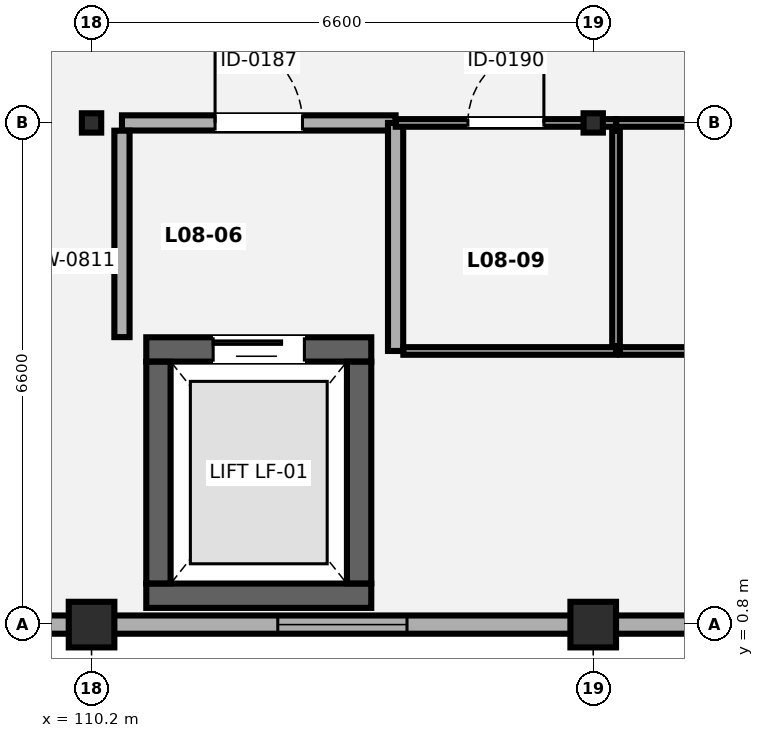
"""IFC4 building model, lengths in metres.
Left out: names, types, materials, properties, quantities, classifications, styles, units other than length and angle.
Written with IfcOpenShell. Run it as: python <this file> out.ifc"""

import sys

from ifc_helpers import new_model, si_unit, direction, frame, frame_2d, origin, origin_2d, place, context, subcontext, project, spatial, rectangle, circle, i_section, extrude, element, fill, save


model = new_model("IFC4")
c1 = context("Model", 3, precision=1e-05, world=origin(), true_north=direction((0.0, 1.0)))
c2 = subcontext(c1, "Body", "Model", "MODEL_VIEW")
j1 = project(units=[si_unit("LENGTHUNIT", "METRE"), si_unit("PLANEANGLEUNIT", "RADIAN")], contexts=[c1])
p1 = place(None, origin())
s1 = spatial("IfcSite", under=j1, at=p1, CompositionType="ELEMENT")
p2 = place(p1, origin())
s2 = spatial("IfcBuilding", under=s1, at=p2, CompositionType="ELEMENT")
p3 = place(p2, frame((0.0, 0.0, 34.3)))
s3 = spatial("IfcBuildingStorey", under=s2, at=p3, CompositionType="ELEMENT", Elevation=34.3)
p4 = place(p3, frame((110.2, 0.8, 0.0), z_axis=(0.0, 0.0, 1.0), x_axis=(1.0, 0.0, 0.0)))
e1 = element("IfcColumn", 1, at=p4, inside=s3, PredefinedType="PILASTER", context=c2, shape_type="SweptSolid", body=[
    extrude(circle(Radius=0.3, at=origin_2d()), origin(), (0.0, 0.0, 1.0), 3.85),
])
p5 = place(p3, frame((110.2, 7.4, 0.0), z_axis=(0.0, 0.0, 1.0), x_axis=(1.0, 0.0, 0.0)))
e2 = element("IfcColumn", 2, at=p5, inside=s3, PredefinedType="COLUMN", context=c2, shape_type="SweptSolid", body=[
    extrude(i_section(OverallWidth=0.254, OverallDepth=0.254, WebThickness=0.009, FlangeThickness=0.014, FilletRadius=0.014, at=origin_2d()), origin(), (0.0, 0.0, 1.0), 3.85),
])
p6 = place(p3, frame((116.8, 0.8, 0.0), z_axis=(0.0, 0.0, 1.0), x_axis=(1.0, 0.0, 0.0)))
e3 = element("IfcColumn", 3, at=p6, inside=s3, PredefinedType="PILASTER", context=c2, shape_type="SweptSolid", body=[
    extrude(circle(Radius=0.3, at=origin_2d()), origin(), (0.0, 0.0, 1.0), 3.85),
])
p7 = place(p3, frame((116.8, 7.4, 0.0), z_axis=(0.0, 0.0, 1.0), x_axis=(1.0, 0.0, 0.0)))
e4 = element("IfcColumn", 4, at=p7, inside=s3, PredefinedType="COLUMN", context=c2, shape_type="SweptSolid", body=[
    extrude(i_section(OverallWidth=0.254, OverallDepth=0.254, WebThickness=0.009, FlangeThickness=0.014, FilletRadius=0.014, at=origin_2d()), origin(), (0.0, 0.0, 1.0), 3.85),
])
p8 = place(p3, frame((149.502, 0.8, 0.0), z_axis=(0.0, 0.0, 1.0), x_axis=(-1.0, 0.0, 0.0)))
e5 = element("IfcWall", 5, at=p8, inside=s3, PredefinedType="SOLIDWALL", context=c2, shape_type="SweptSolid", body=[
    extrude(rectangle(XDim=45.604, YDim=0.24, at=frame_2d((22.802, 0.0))), origin(), (0.0, 0.0, 1.0), 3.155),
])
p9 = place(p8, frame((41.827, 0.0, 0.85)))
e6 = element("IfcOpeningElement", 6, at=p9, cuts=e5, PredefinedType="OPENING", context=c2, shape_type="SweptSolid", body=[
    extrude(rectangle(XDim=1.55, YDim=1.4, at=frame_2d((0.775, 0.7))), frame((0.0, 0.13, 0.0), z_axis=(0.0, -1.0, 0.0), x_axis=(1.0, 0.0, 0.0)), (0.0, 0.0, 1.0), 0.26),
])
p10 = place(p8, frame((35.152, 0.0, 0.85)))
e7 = element("IfcOpeningElement", 7, at=p10, cuts=e5, PredefinedType="OPENING", context=c2, shape_type="SweptSolid", body=[
    extrude(rectangle(XDim=1.7, YDim=1.4, at=frame_2d((0.85, 0.7))), frame((0.0, 0.13, 0.0), z_axis=(0.0, -1.0, 0.0), x_axis=(1.0, 0.0, 0.0)), (0.0, 0.0, 1.0), 0.26),
])
p11 = place(p8, frame((28.477, 0.0, 0.85)))
e8 = element("IfcOpeningElement", 8, at=p11, cuts=e5, PredefinedType="OPENING", context=c2, shape_type="SweptSolid", body=[
    extrude(rectangle(XDim=1.85, YDim=1.4, at=frame_2d((0.925, 0.7))), frame((0.0, 0.13, 0.0), z_axis=(0.0, -1.0, 0.0), x_axis=(1.0, 0.0, 0.0)), (0.0, 0.0, 1.0), 0.26),
])
p12 = place(p8, frame((21.802, 0.0, 0.85)))
e9 = element("IfcOpeningElement", 9, at=p12, cuts=e5, PredefinedType="OPENING", context=c2, shape_type="SweptSolid", body=[
    extrude(rectangle(XDim=2.0, YDim=1.4, at=frame_2d((1.0, 0.7))), frame((0.0, 0.13, 0.0), z_axis=(0.0, -1.0, 0.0), x_axis=(1.0, 0.0, 0.0)), (0.0, 0.0, 1.0), 0.26),
])
p13 = place(p8, frame((15.127, 0.0, 0.85)))
e10 = element("IfcOpeningElement", 10, at=p13, cuts=e5, PredefinedType="OPENING", context=c2, shape_type="SweptSolid", body=[
    extrude(rectangle(XDim=2.15, YDim=1.4, at=frame_2d((1.075, 0.7))), frame((0.0, 0.13, 0.0), z_axis=(0.0, -1.0, 0.0), x_axis=(1.0, 0.0, 0.0)), (0.0, 0.0, 1.0), 0.26),
])
p14 = place(p8, frame((8.452, 0.0, 0.85)))
e11 = element("IfcOpeningElement", 11, at=p14, cuts=e5, PredefinedType="OPENING", context=c2, shape_type="SweptSolid", body=[
    extrude(rectangle(XDim=2.3, YDim=1.4, at=frame_2d((1.15, 0.7))), frame((0.0, 0.13, 0.0), z_axis=(0.0, -1.0, 0.0), x_axis=(1.0, 0.0, 0.0)), (0.0, 0.0, 1.0), 0.26),
])
p15 = place(p8, frame((1.777, 0.0, 0.85)))
e12 = element("IfcOpeningElement", 12, at=p15, cuts=e5, PredefinedType="OPENING", context=c2, shape_type="SweptSolid", body=[
    extrude(rectangle(XDim=2.45, YDim=1.4, at=frame_2d((1.225, 0.7))), frame((0.0, 0.13, 0.0), z_axis=(0.0, -1.0, 0.0), x_axis=(1.0, 0.0, 0.0)), (0.0, 0.0, 1.0), 0.26),
])
p16 = place(p3, frame((110.92, 1.18, 0.0), z_axis=(0.0, 0.0, 1.0), x_axis=(1.0, 0.0, 0.0)))
e13 = element("IfcWall", 13, at=p16, inside=s3, PredefinedType="SHEAR", context=c2, shape_type="SweptSolid", body=[
    extrude(rectangle(XDim=2.96, YDim=0.32, at=frame_2d((1.48, 0.0))), origin(), (0.0, 0.0, 1.0), 3.67),
])
p17 = place(p3, frame((110.92, 4.42, 0.0), z_axis=(0.0, 0.0, 1.0), x_axis=(1.0, 0.0, 0.0)))
e14 = element("IfcWall", 14, at=p17, inside=s3, PredefinedType="SHEAR", context=c2, shape_type="SweptSolid", body=[
    extrude(rectangle(XDim=2.96, YDim=0.32, at=frame_2d((1.48, 0.0))), origin(), (0.0, 0.0, 1.0), 3.67),
])
p18 = place(p17, frame((0.88, 0.0, 0.0)))
e15 = element("IfcOpeningElement", 15, at=p18, cuts=e14, PredefinedType="OPENING", context=c2, shape_type="SweptSolid", body=[
    extrude(rectangle(XDim=1.2, YDim=2.2, at=frame_2d((0.6, 1.1))), frame((0.0, 0.17, 0.0), z_axis=(0.0, -1.0, 0.0), x_axis=(1.0, 0.0, 0.0)), (0.0, 0.0, 1.0), 0.34),
])
for number, where, z_axis, x_axis in (
    (16, (111.08, 1.342, 0.0), (0.0, 0.0, 1.0), (0.0, 1.0, 0.0)),
    (17, (113.72, 1.342, 0.0), (0.0, 0.0, 1.0), (0.0, 1.0, 0.0)),
):
    element("IfcWall", number, at=place(p3, frame(where, z_axis=z_axis, x_axis=x_axis)), inside=s3, PredefinedType="SHEAR", context=c2, shape_type="SweptSolid", body=[
        extrude(rectangle(XDim=2.916, YDim=0.32, at=frame_2d((1.458, 0.0))), origin(), (0.0, 0.0, 1.0), 3.67),
    ])
p19 = place(p3, frame((110.6, 7.4, 0.0), z_axis=(0.0, 0.0, 1.0), x_axis=(1.0, 0.0, 0.0)))
e18 = element("IfcWall", 18, at=p19, inside=s3, PredefinedType="SOLIDWALL", context=c2, shape_type="SweptSolid", body=[
    extrude(rectangle(XDim=3.6, YDim=0.2, at=frame_2d((1.8, 0.0))), origin(), (0.0, 0.0, 1.0), 2.943),
])
p20 = place(p19, frame((1.225, 0.0, 0.0)))
e19 = element("IfcOpeningElement", 19, at=p20, cuts=e18, PredefinedType="OPENING", context=c2, shape_type="SweptSolid", body=[
    extrude(rectangle(XDim=1.15, YDim=2.15, at=frame_2d((0.575, 1.075))), frame((0.0, 0.11, 0.0), z_axis=(0.0, -1.0, 0.0), x_axis=(1.0, 0.0, 0.0)), (0.0, 0.0, 1.0), 0.22),
])
p21 = place(p3, frame((110.6, 4.582, 0.0), z_axis=(0.0, 0.0, 1.0), x_axis=(0.0, 1.0, 0.0)))
e20 = element("IfcWall", 20, at=p21, inside=s3, PredefinedType="SOLIDWALL", context=c2, shape_type="SweptSolid", body=[
    extrude(rectangle(XDim=2.716, YDim=0.2, at=frame_2d((1.358, 0.0))), origin(), (0.0, 0.0, 1.0), 3.67),
])
p22 = place(p3, frame((114.2, 4.4, 0.0), z_axis=(0.0, 0.0, 1.0), x_axis=(0.0, 1.0, 0.0)))
e21 = element("IfcWall", 21, at=p22, inside=s3, PredefinedType="SOLIDWALL", context=c2, shape_type="SweptSolid", body=[
    extrude(rectangle(XDim=3.0, YDim=0.2, at=frame_2d((1.5, 0.0))), origin(), (0.0, 0.0, 1.0), 3.67),
])
p23 = place(p3, frame((114.302, 4.4, 0.0), z_axis=(0.0, 0.0, 1.0), x_axis=(1.0, 0.0, 0.0)))
e22 = element("IfcWall", 22, at=p23, inside=s3, PredefinedType="PARTITIONING", context=c2, shape_type="SweptSolid", body=[
    extrude(rectangle(XDim=2.798, YDim=0.1, at=frame_2d((1.399, 0.0))), origin(), (0.0, 0.0, 1.0), 3.67),
])
p24 = place(p3, frame((114.202, 7.4, 0.0), z_axis=(0.0, 0.0, 1.0), x_axis=(1.0, 0.0, 0.0)))
e23 = element("IfcWall", 23, at=p24, inside=s3, PredefinedType="PARTITIONING", context=c2, shape_type="SweptSolid", body=[
    extrude(rectangle(XDim=2.898, YDim=0.1, at=frame_2d((1.449, 0.0))), origin(), (0.0, 0.0, 1.0), 2.943),
])
p25 = place(p24, frame((0.949, 0.0, 0.0)))
e24 = element("IfcOpeningElement", 24, at=p25, cuts=e23, PredefinedType="OPENING", context=c2, shape_type="SweptSolid", body=[
    extrude(rectangle(XDim=1.0, YDim=2.1, at=frame_2d((0.5, 1.05))), frame((0.0, 0.06, 0.0), z_axis=(0.0, -1.0, 0.0), x_axis=(1.0, 0.0, 0.0)), (0.0, 0.0, 1.0), 0.12),
])
p26 = place(p3, frame((117.1, 4.462, 0.0), z_axis=(0.0, 0.0, 1.0), x_axis=(0.0, 1.0, 0.0)))
e25 = element("IfcWall", 25, at=p26, inside=s3, PredefinedType="PARTITIONING", context=c2, shape_type="SweptSolid", body=[
    extrude(rectangle(XDim=2.836, YDim=0.1, at=frame_2d((1.418, 0.0))), origin(), (0.0, 0.0, 1.0), 3.67),
])
p27 = place(p3, frame((117.152, 4.4, 0.0), z_axis=(0.0, 0.0, 1.0), x_axis=(1.0, 0.0, 0.0)))
e26 = element("IfcWall", 26, at=p27, inside=s3, PredefinedType="PARTITIONING", context=c2, shape_type="SweptSolid", body=[
    extrude(rectangle(XDim=2.848, YDim=0.1, at=frame_2d((1.424, 0.0))), origin(), (0.0, 0.0, 1.0), 3.67),
])
p28 = place(p3, frame((117.102, 7.4, 0.0), z_axis=(0.0, 0.0, 1.0), x_axis=(1.0, 0.0, 0.0)))
e27 = element("IfcWall", 27, at=p28, inside=s3, PredefinedType="PARTITIONING", context=c2, shape_type="SweptSolid", body=[
    extrude(rectangle(XDim=2.898, YDim=0.1, at=frame_2d((1.449, 0.0))), origin(), (0.0, 0.0, 1.0), 2.943),
])
p29 = place(p28, frame((1.009, 0.0, 0.0)))
e28 = element("IfcOpeningElement", 28, at=p29, cuts=e27, PredefinedType="OPENING", context=c2, shape_type="SweptSolid", body=[
    extrude(rectangle(XDim=0.88, YDim=2.08, at=frame_2d((0.44, 1.04))), frame((0.0, 0.06, 0.0), z_axis=(0.0, -1.0, 0.0), x_axis=(1.0, 0.0, 0.0)), (0.0, 0.0, 1.0), 0.12),
])
p30 = place(p10, origin())
e29 = element("IfcWindow", 29, at=p30, inside=s3, PartitioningType="SINGLE_PANEL", PredefinedType="WINDOW", context=c2, shape_type="SweptSolid", body=[
    extrude(rectangle(XDim=1.7, YDim=1.4, at=frame_2d((0.85, 0.7))), frame((0.0, 0.03, 0.0), z_axis=(0.0, -1.0, 0.0), x_axis=(1.0, 0.0, 0.0)), (0.0, 0.0, 1.0), 0.06),
])
fill(e7, e29)
p31 = place(p18, origin())
e30 = element("IfcDoor", 30, at=p31, inside=s3, OperationType="SLIDING_TO_LEFT", PredefinedType="DOOR", context=c2, shape_type="SweptSolid", body=[
    extrude(rectangle(XDim=1.2, YDim=2.2, at=frame_2d((0.6, 1.1))), frame((0.0, 0.025, 0.0), z_axis=(0.0, -1.0, 0.0), x_axis=(1.0, 0.0, 0.0)), (0.0, 0.0, 1.0), 0.05),
])
fill(e15, e30)
p32 = place(p20, origin())
e31 = element("IfcDoor", 31, at=p32, inside=s3, OperationType="SINGLE_SWING_LEFT", PredefinedType="DOOR", context=c2, shape_type="SweptSolid", body=[
    extrude(rectangle(XDim=1.15, YDim=2.15, at=frame_2d((0.575, 1.075))), frame((0.0, 0.025, 0.0), z_axis=(0.0, -1.0, 0.0), x_axis=(1.0, 0.0, 0.0)), (0.0, 0.0, 1.0), 0.05),
])
fill(e19, e31)
p33 = place(p25, origin())
e32 = element("IfcDoor", 32, at=p33, inside=s3, OperationType="SINGLE_SWING_RIGHT", PredefinedType="DOOR", context=c2, shape_type="SweptSolid", body=[
    extrude(rectangle(XDim=1.0, YDim=2.1, at=frame_2d((0.5, 1.05))), frame((0.0, 0.025, 0.0), z_axis=(0.0, -1.0, 0.0), x_axis=(1.0, 0.0, 0.0)), (0.0, 0.0, 1.0), 0.05),
])
fill(e24, e32)
save(model, sys.argv[1])
